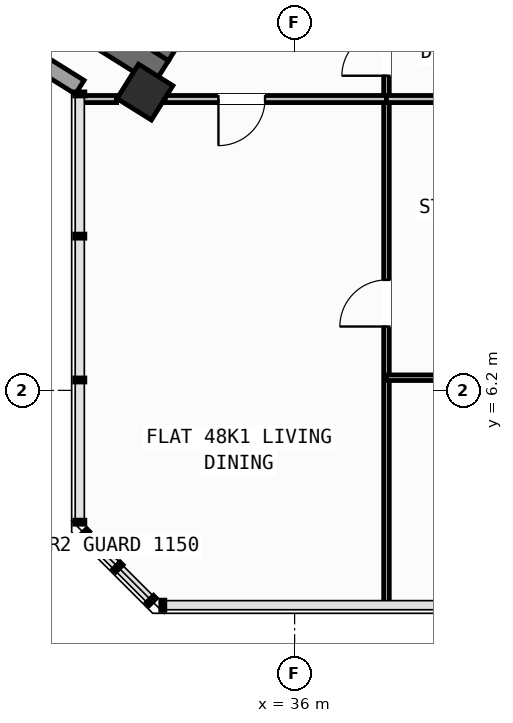
"""IFC4 building model, lengths in metres.
Left out: names, types, materials, properties, quantities, classifications, styles, units other than length and angle.
Written with IfcOpenShell. Run it as: python <this file> out.ifc"""

import sys

from ifc_helpers import new_model, si_unit, direction, frame, frame_2d, origin, origin_2d, place, context, subcontext, project, spatial, rectangle, hollow_rectangle, extrude, source, transform, mapped, element, fill, save


model = new_model("IFC4")
c1 = context("Model", 3, precision=1e-05, world=origin(), true_north=direction((0.0, 1.0)))
c2 = subcontext(c1, "Body", "Model", "MODEL_VIEW")
j1 = project(units=[si_unit("LENGTHUNIT", "METRE"), si_unit("PLANEANGLEUNIT", "RADIAN")], contexts=[c1])
p1 = place(None, origin())
s1 = spatial("IfcSite", under=j1, at=p1, CompositionType="ELEMENT")
p2 = place(p1, origin())
s2 = spatial("IfcBuilding", under=s1, at=p2, CompositionType="ELEMENT")
p3 = place(p2, frame((0.0, 0.0, 191.4)))
s3 = spatial("IfcBuildingStorey", under=s2, at=p3, CompositionType="ELEMENT", Elevation=191.4)
p4 = place(p3, frame((33.366, 12.477, 0.0), z_axis=(0.0, 0.0, 1.0), x_axis=(-0.848047359947, 0.529920442413, 0.0)))
e1 = element("IfcWall", 1, at=p4, inside=s3, PredefinedType="SHEAR", context=c2, shape_type="SweptSolid", body=[
    extrude(rectangle(XDim=13.14, YDim=0.55, at=frame_2d((6.57, 0.0))), origin(), (0.0, 0.0, 1.0), 3.32),
])
p5 = place(p3, frame((36.683, 18.304, 0.0), z_axis=(0.0, 0.0, 1.0), x_axis=(-0.529896466841, -0.848062341122, 0.0)))
e2 = element("IfcWall", 2, at=p5, inside=s3, PredefinedType="SHEAR", context=c2, shape_type="SweptSolid", body=[
    extrude(rectangle(XDim=6.425, YDim=0.55, at=frame_2d((3.212, 0.0))), origin(), (0.0, 0.0, 1.0), 3.32),
])
m1 = source(origin(), c2, "Body", "SweptSolid", [
    extrude(hollow_rectangle(XDim=0.8, YDim=0.8, WallThickness=0.032, at=origin_2d()), origin(), (0.0, 0.0, 1.0), 3.6),
])
p6 = place(p3, frame((33.046, 12.087, 0.0), z_axis=(0.0, 0.0, 1.0), x_axis=(-0.848048096156, 0.529919264233, 0.0)))
e3 = element("IfcColumn", 3, at=p6, inside=s3, PredefinedType="COLUMN", context=c2, shape_type="MappedRepresentation", body=[
    mapped(m1, transform((0.0, 0.0, 0.0), scale=1.0)),
])
p7 = place(p3, frame((31.76, 12.183, 0.0), z_axis=(0.0, 0.0, 1.0), x_axis=(-0.848047074256, 0.529920899612, 0.0)))
e4 = element("IfcWall", 4, at=p7, inside=s3, PredefinedType="STANDARD", context=c2, shape_type="SweptSolid", body=[
    extrude(rectangle(XDim=30.652, YDim=0.32, at=frame_2d((15.326, 0.0))), origin(), (0.0, 0.0, 1.0), 3.32),
])
p8 = place(p7, frame((15.166, 0.0, 0.0)))
e5 = element("IfcOpeningElement", 5, at=p8, cuts=e4, PredefinedType="OPENING", context=c2, shape_type="SweptSolid", body=[
    extrude(rectangle(XDim=1.2, YDim=2.15, at=frame_2d((0.6, 1.075))), frame((0.0, 0.17, 0.0), z_axis=(0.0, -1.0, 0.0), x_axis=(1.0, 0.0, 0.0)), (0.0, 0.0, 1.0), 0.34),
])
p9 = place(p7, frame((2.015, 0.0, 0.8)))
e6 = element("IfcOpeningElement", 6, at=p9, cuts=e4, PredefinedType="OPENING", context=c2, shape_type="SweptSolid", body=[
    extrude(rectangle(XDim=2.1, YDim=1.55, at=frame_2d((1.05, 0.775))), frame((0.0, 0.17, 0.0), z_axis=(0.0, -1.0, 0.0), x_axis=(1.0, 0.0, 0.0)), (0.0, 0.0, 1.0), 0.34),
])
p10 = place(p7, frame((7.244, 0.0, 0.8)))
e7 = element("IfcOpeningElement", 7, at=p10, cuts=e4, PredefinedType="OPENING", context=c2, shape_type="SweptSolid", body=[
    extrude(rectangle(XDim=2.1, YDim=1.55, at=frame_2d((1.05, 0.775))), frame((0.0, 0.17, 0.0), z_axis=(0.0, -1.0, 0.0), x_axis=(1.0, 0.0, 0.0)), (0.0, 0.0, 1.0), 0.34),
])
p11 = place(p7, frame((12.623, 0.0, 1.0)))
e8 = element("IfcOpeningElement", 8, at=p11, cuts=e4, PredefinedType="OPENING", context=c2, shape_type="SweptSolid", body=[
    extrude(rectangle(XDim=0.9, YDim=1.25, at=frame_2d((0.45, 0.625))), frame((0.0, 0.17, 0.0), z_axis=(0.0, -1.0, 0.0), x_axis=(1.0, 0.0, 0.0)), (0.0, 0.0, 1.0), 0.34),
])
p12 = place(p7, frame((19.565, 0.0, 0.95)))
e9 = element("IfcOpeningElement", 9, at=p12, cuts=e4, PredefinedType="OPENING", context=c2, shape_type="SweptSolid", body=[
    extrude(rectangle(XDim=1.2, YDim=1.4, at=frame_2d((0.6, 0.7))), frame((0.0, 0.17, 0.0), z_axis=(0.0, -1.0, 0.0), x_axis=(1.0, 0.0, 0.0)), (0.0, 0.0, 1.0), 0.34),
])
p13 = place(p7, frame((25.983, 0.0, 1.0)))
e10 = element("IfcOpeningElement", 10, at=p13, cuts=e4, PredefinedType="OPENING", context=c2, shape_type="SweptSolid", body=[
    extrude(rectangle(XDim=0.9, YDim=1.25, at=frame_2d((0.45, 0.625))), frame((0.0, 0.17, 0.0), z_axis=(0.0, -1.0, 0.0), x_axis=(1.0, 0.0, 0.0)), (0.0, 0.0, 1.0), 0.34),
])
p14 = place(p7, frame((28.433, 0.0, 1.0)))
e11 = element("IfcOpeningElement", 11, at=p14, cuts=e4, PredefinedType="OPENING", context=c2, shape_type="SweptSolid", body=[
    extrude(rectangle(XDim=0.9, YDim=1.25, at=frame_2d((0.45, 0.625))), frame((0.0, 0.17, 0.0), z_axis=(0.0, -1.0, 0.0), x_axis=(1.0, 0.0, 0.0)), (0.0, 0.0, 1.0), 0.34),
])
p15 = place(p3, frame((37.813, 1.96, 0.0), z_axis=(0.0, 0.0, 1.0), x_axis=(0.0, 1.0, 0.0)))
e12 = element("IfcWall", 12, at=p15, inside=s3, PredefinedType="PARTITIONING", context=c2, shape_type="SweptSolid", body=[
    extrude(rectangle(XDim=13.46, YDim=0.11, at=frame_2d((6.73, 0.0))), origin(), (0.0, 0.0, 1.0), 3.31),
])
p16 = place(p15, frame((5.5, 0.0, 0.0)))
e13 = element("IfcOpeningElement", 13, at=p16, cuts=e12, PredefinedType="OPENING", context=c2, shape_type="SweptSolid", body=[
    extrude(rectangle(XDim=0.92, YDim=2.08, at=frame_2d((0.46, 1.04))), frame((0.0, 0.065, 0.0), z_axis=(0.0, -1.0, 0.0), x_axis=(1.0, 0.0, 0.0)), (0.0, 0.0, 1.0), 0.13),
])
p17 = place(p15, frame((10.45, 0.0, 0.0)))
e14 = element("IfcOpeningElement", 14, at=p17, cuts=e12, PredefinedType="OPENING", context=c2, shape_type="SweptSolid", body=[
    extrude(rectangle(XDim=0.88, YDim=2.08, at=frame_2d((0.44, 1.04))), frame((0.0, 0.065, 0.0), z_axis=(0.0, -1.0, 0.0), x_axis=(1.0, 0.0, 0.0)), (0.0, 0.0, 1.0), 0.13),
])
p18 = place(p3, frame((31.74, 11.95, 0.0), z_axis=(0.0, 0.0, 1.0), x_axis=(1.0, 0.0, 0.0)))
e15 = element("IfcWall", 15, at=p18, inside=s3, PredefinedType="PLUMBINGWALL", context=c2, shape_type="SweptSolid", body=[
    extrude(rectangle(XDim=0.748, YDim=0.14, at=frame_2d((0.374, 0.0))), origin(), (0.0, 0.0, 1.0), 3.31),
])
p19 = place(p3, frame((33.447, 11.95, 0.0), z_axis=(0.0, 0.0, 1.0), x_axis=(1.0, 0.0, 0.0)))
e16 = element("IfcWall", 16, at=p19, inside=s3, PredefinedType="PLUMBINGWALL", context=c2, shape_type="SweptSolid", body=[
    extrude(rectangle(XDim=4.366, YDim=0.14, at=frame_2d((2.183, 0.0))), origin(), (0.0, 0.0, 1.0), 2.495),
])
p20 = place(p19, frame((1.05, 0.0, 0.0)))
e17 = element("IfcOpeningElement", 17, at=p20, cuts=e16, PredefinedType="OPENING", context=c2, shape_type="SweptSolid", body=[
    extrude(rectangle(XDim=0.92, YDim=2.08, at=frame_2d((0.46, 1.04))), frame((0.0, 0.08, 0.0), z_axis=(0.0, -1.0, 0.0), x_axis=(1.0, 0.0, 0.0)), (0.0, 0.0, 1.0), 0.16),
])
p21 = place(p3, frame((37.813, 11.95, 0.0), z_axis=(0.0, 0.0, 1.0), x_axis=(1.0, 0.0, 0.0)))
e18 = element("IfcWall", 18, at=p21, inside=s3, PredefinedType="PLUMBINGWALL", context=c2, shape_type="SweptSolid", body=[
    extrude(rectangle(XDim=4.137, YDim=0.14, at=frame_2d((2.068, 0.0))), origin(), (0.0, 0.0, 1.0), 2.495),
])
p22 = place(p3, frame((37.813, 6.45, 0.0), z_axis=(0.0, 0.0, 1.0), x_axis=(1.0, 0.0, 0.0)))
e19 = element("IfcWall", 19, at=p22, inside=s3, PredefinedType="PARTITIONING", context=c2, shape_type="SweptSolid", body=[
    extrude(rectangle(XDim=4.137, YDim=0.11, at=frame_2d((2.068, 0.0))), origin(), (0.0, 0.0, 1.0), 3.31),
])
p23 = place(p22, frame((1.608, 0.0, 0.0)))
e20 = element("IfcOpeningElement", 20, at=p23, cuts=e19, PredefinedType="OPENING", context=c2, shape_type="SweptSolid", body=[
    extrude(rectangle(XDim=0.92, YDim=2.08, at=frame_2d((0.46, 1.04))), frame((0.0, 0.065, 0.0), z_axis=(0.0, -1.0, 0.0), x_axis=(1.0, 0.0, 0.0)), (0.0, 0.0, 1.0), 0.13),
])
m2 = source(origin(), c2, "Body", "SweptSolid", [
    extrude(rectangle(XDim=0.92, YDim=2.08, at=frame_2d((0.46, 1.04))), frame((0.0, 0.025, 0.0), z_axis=(0.0, -1.0, 0.0), x_axis=(1.0, 0.0, 0.0)), (0.0, 0.0, 1.0), 0.05),
])
p24 = place(p16, origin())
e21 = element("IfcDoor", 21, at=p24, inside=s3, OperationType="SINGLE_SWING_LEFT", PredefinedType="DOOR", context=c2, shape_type="MappedRepresentation", body=[
    mapped(m2, transform((0.0, 0.0, 0.0), scale=1.0)),
])
fill(e13, e21)
p25 = place(p20, frame((0.92, 0.0, 0.0), z_axis=(0.0, 0.0, 1.0), x_axis=(-1.0, 0.0, 0.0)))
e22 = element("IfcDoor", 22, at=p25, inside=s3, OperationType="SINGLE_SWING_RIGHT", PredefinedType="DOOR", context=c2, shape_type="MappedRepresentation", body=[
    mapped(m2, transform((0.0, 0.0, 0.0), scale=1.0)),
])
fill(e17, e22)
m3 = source(origin(), c2, "Body", "SweptSolid", [
    extrude(rectangle(XDim=0.88, YDim=2.08, at=frame_2d((0.44, 1.04))), frame((0.0, 0.025, 0.0), z_axis=(0.0, -1.0, 0.0), x_axis=(1.0, 0.0, 0.0)), (0.0, 0.0, 1.0), 0.05),
])
p26 = place(p17, origin())
e23 = element("IfcDoor", 23, at=p26, inside=s3, OperationType="SINGLE_SWING_LEFT", PredefinedType="DOOR", context=c2, shape_type="MappedRepresentation", body=[
    mapped(m3, transform((0.0, 0.0, 0.0), scale=1.0)),
])
fill(e14, e23)
save(model, sys.argv[1])
